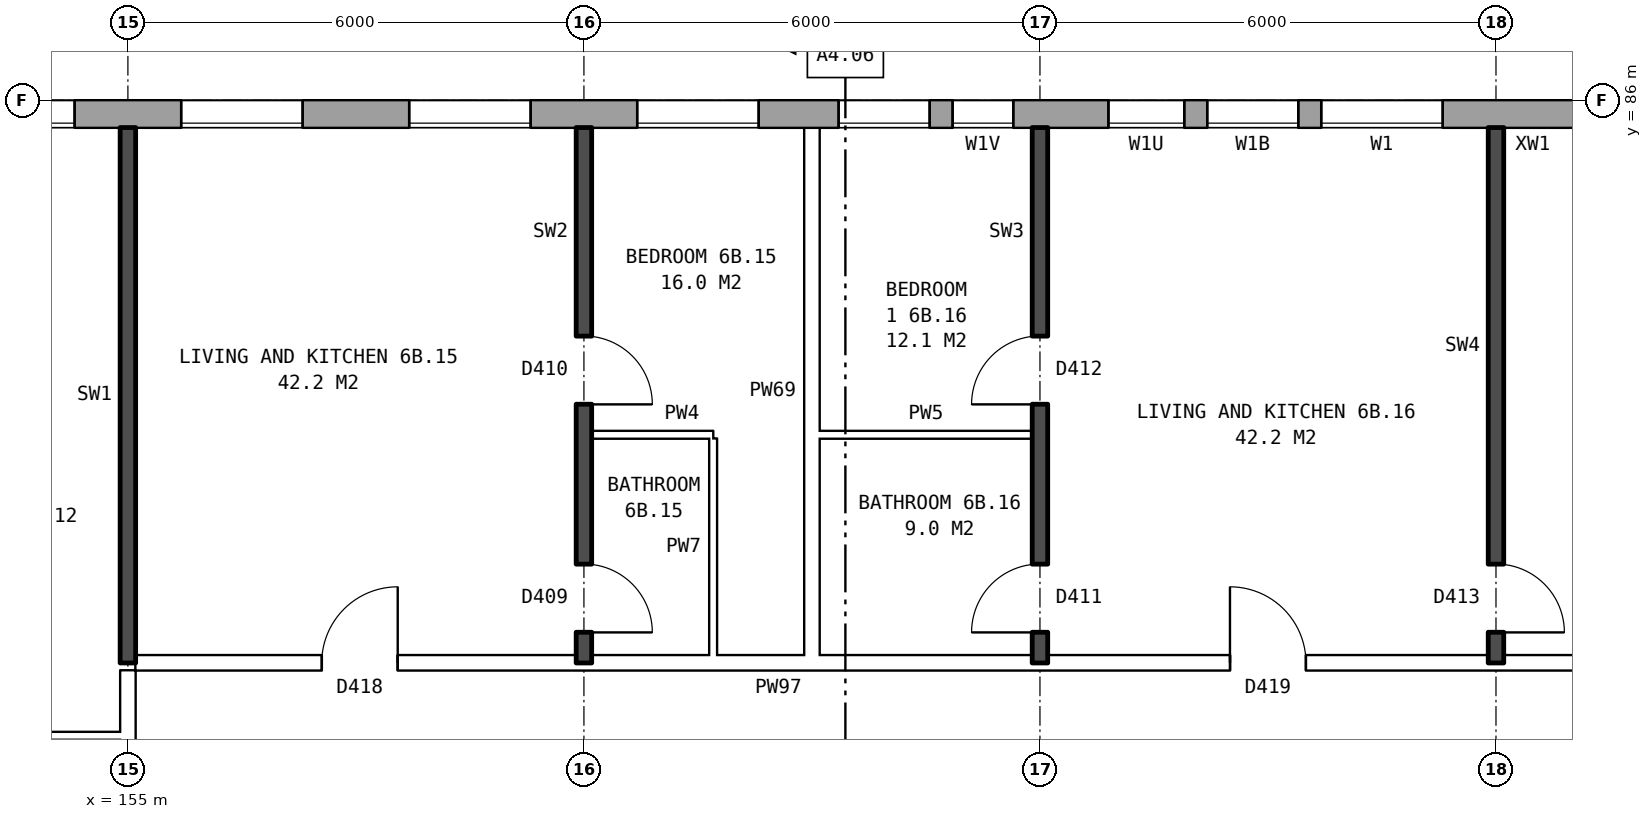
"""IFC4 building model, lengths in metres.
Left out: names, types, materials, properties, quantities, classifications, styles, units other than length and angle.
Written with IfcOpenShell. Run it as: python <this file> out.ifc"""

import sys

from ifc_helpers import new_model, si_unit, direction, frame, frame_2d, origin, place, context, subcontext, project, spatial, rectangle, extrude, element, fill, save


model = new_model("IFC4")
c1 = context("Model", 3, precision=1e-05, world=origin(), true_north=direction((0.0, 1.0)))
c2 = subcontext(c1, "Body", "Model", "MODEL_VIEW")
j1 = project(units=[si_unit("LENGTHUNIT", "METRE"), si_unit("PLANEANGLEUNIT", "RADIAN")], contexts=[c1])
p1 = place(None, origin())
s1 = spatial("IfcSite", under=j1, at=p1, CompositionType="ELEMENT")
p2 = place(p1, origin())
s2 = spatial("IfcBuilding", under=s1, at=p2, CompositionType="ELEMENT")
p3 = place(p2, frame((0.0, 0.0, 25.7)))
s3 = spatial("IfcBuildingStorey", under=s2, at=p3, CompositionType="ELEMENT", Elevation=25.7)
p4 = place(p3, frame((174.675, 85.82, 0.0), z_axis=(0.0, 0.0, 1.0), x_axis=(-1.0, 0.0, 0.0)))
e1 = element("IfcWall", 1, at=p4, inside=s3, PredefinedType="STANDARD", context=c2, shape_type="SweptSolid", body=[
    extrude(rectangle(XDim=40.601, YDim=0.36, at=frame_2d((20.3, 0.0))), origin(), (0.0, 0.0, 1.0), 2.85),
])
p5 = place(p4, frame((2.375, 0.0, 0.8)))
e2 = element("IfcOpeningElement", 2, at=p5, cuts=e1, PredefinedType="OPENING", context=c2, shape_type="SweptSolid", body=[
    extrude(rectangle(XDim=1.6, YDim=1.8, at=frame_2d((0.8, 0.9))), frame((0.0, 0.19, 0.0), z_axis=(0.0, -1.0, 0.0), x_axis=(1.0, 0.0, 0.0)), (0.0, 0.0, 1.0), 0.38),
])
p6 = place(p4, frame((4.275, 0.0, 0.8)))
e3 = element("IfcOpeningElement", 3, at=p6, cuts=e1, PredefinedType="OPENING", context=c2, shape_type="SweptSolid", body=[
    extrude(rectangle(XDim=1.2, YDim=1.8, at=frame_2d((0.6, 0.9))), frame((0.0, 0.19, 0.0), z_axis=(0.0, -1.0, 0.0), x_axis=(1.0, 0.0, 0.0)), (0.0, 0.0, 1.0), 0.38),
])
p7 = place(p4, frame((8.025, 0.0, 0.8)))
e4 = element("IfcOpeningElement", 4, at=p7, cuts=e1, PredefinedType="OPENING", context=c2, shape_type="SweptSolid", body=[
    extrude(rectangle(XDim=0.8, YDim=0.9, at=frame_2d((0.4, 0.45))), frame((0.0, 0.19, 0.0), z_axis=(0.0, -1.0, 0.0), x_axis=(1.0, 0.0, 0.0)), (0.0, 0.0, 1.0), 0.38),
])
p8 = place(p4, frame((11.375, 0.0, 0.8)))
e5 = element("IfcOpeningElement", 5, at=p8, cuts=e1, PredefinedType="OPENING", context=c2, shape_type="SweptSolid", body=[
    extrude(rectangle(XDim=1.6, YDim=1.8, at=frame_2d((0.8, 0.9))), frame((0.0, 0.19, 0.0), z_axis=(0.0, -1.0, 0.0), x_axis=(1.0, 0.0, 0.0)), (0.0, 0.0, 1.0), 0.38),
])
p9 = place(p4, frame((14.375, 0.0, 0.8)))
e6 = element("IfcOpeningElement", 6, at=p9, cuts=e1, PredefinedType="OPENING", context=c2, shape_type="SweptSolid", body=[
    extrude(rectangle(XDim=1.6, YDim=1.8, at=frame_2d((0.8, 0.9))), frame((0.0, 0.19, 0.0), z_axis=(0.0, -1.0, 0.0), x_axis=(1.0, 0.0, 0.0)), (0.0, 0.0, 1.0), 0.38),
])
p10 = place(p4, frame((17.375, 0.0, 0.8)))
e7 = element("IfcOpeningElement", 7, at=p10, cuts=e1, PredefinedType="OPENING", context=c2, shape_type="SweptSolid", body=[
    extrude(rectangle(XDim=1.6, YDim=1.8, at=frame_2d((0.8, 0.9))), frame((0.0, 0.19, 0.0), z_axis=(0.0, -1.0, 0.0), x_axis=(1.0, 0.0, 0.0)), (0.0, 0.0, 1.0), 0.38),
])
p11 = place(p4, frame((20.375, 0.0, 0.8)))
e8 = element("IfcOpeningElement", 8, at=p11, cuts=e1, PredefinedType="OPENING", context=c2, shape_type="SweptSolid", body=[
    extrude(rectangle(XDim=1.6, YDim=1.8, at=frame_2d((0.8, 0.9))), frame((0.0, 0.19, 0.0), z_axis=(0.0, -1.0, 0.0), x_axis=(1.0, 0.0, 0.0)), (0.0, 0.0, 1.0), 0.38),
])
p12 = place(p4, frame((23.375, 0.0, 0.8)))
e9 = element("IfcOpeningElement", 9, at=p12, cuts=e1, PredefinedType="OPENING", context=c2, shape_type="SweptSolid", body=[
    extrude(rectangle(XDim=1.6, YDim=1.8, at=frame_2d((0.8, 0.9))), frame((0.0, 0.19, 0.0), z_axis=(0.0, -1.0, 0.0), x_axis=(1.0, 0.0, 0.0)), (0.0, 0.0, 1.0), 0.38),
])
p13 = place(p4, frame((26.375, 0.0, 0.8)))
e10 = element("IfcOpeningElement", 10, at=p13, cuts=e1, PredefinedType="OPENING", context=c2, shape_type="SweptSolid", body=[
    extrude(rectangle(XDim=1.6, YDim=1.8, at=frame_2d((0.8, 0.9))), frame((0.0, 0.19, 0.0), z_axis=(0.0, -1.0, 0.0), x_axis=(1.0, 0.0, 0.0)), (0.0, 0.0, 1.0), 0.38),
])
p14 = place(p4, frame((29.375, 0.0, 0.8)))
e11 = element("IfcOpeningElement", 11, at=p14, cuts=e1, PredefinedType="OPENING", context=c2, shape_type="SweptSolid", body=[
    extrude(rectangle(XDim=1.6, YDim=1.8, at=frame_2d((0.8, 0.9))), frame((0.0, 0.19, 0.0), z_axis=(0.0, -1.0, 0.0), x_axis=(1.0, 0.0, 0.0)), (0.0, 0.0, 1.0), 0.38),
])
p15 = place(p4, frame((31.875, 0.0, 0.8)))
e12 = element("IfcOpeningElement", 12, at=p15, cuts=e1, PredefinedType="OPENING", context=c2, shape_type="SweptSolid", body=[
    extrude(rectangle(XDim=0.6, YDim=0.9, at=frame_2d((0.3, 0.45))), frame((0.0, 0.19, 0.0), z_axis=(0.0, -1.0, 0.0), x_axis=(1.0, 0.0, 0.0)), (0.0, 0.0, 1.0), 0.38),
])
p16 = place(p4, frame((35.375, 0.0, 0.8)))
e13 = element("IfcOpeningElement", 13, at=p16, cuts=e1, PredefinedType="OPENING", context=c2, shape_type="SweptSolid", body=[
    extrude(rectangle(XDim=1.6, YDim=1.8, at=frame_2d((0.8, 0.9))), frame((0.0, 0.19, 0.0), z_axis=(0.0, -1.0, 0.0), x_axis=(1.0, 0.0, 0.0)), (0.0, 0.0, 1.0), 0.38),
])
p17 = place(p4, frame((38.375, 0.0, 0.8)))
e14 = element("IfcOpeningElement", 14, at=p17, cuts=e1, PredefinedType="OPENING", context=c2, shape_type="SweptSolid", body=[
    extrude(rectangle(XDim=1.6, YDim=1.8, at=frame_2d((0.8, 0.9))), frame((0.0, 0.19, 0.0), z_axis=(0.0, -1.0, 0.0), x_axis=(1.0, 0.0, 0.0)), (0.0, 0.0, 1.0), 0.38),
])
p18 = place(p4, frame((5.775, 0.0, 1.7)))
e15 = element("IfcOpeningElement", 15, at=p18, cuts=e1, PredefinedType="OPENING", context=c2, shape_type="SweptSolid", body=[
    extrude(rectangle(XDim=1.0, YDim=0.9, at=frame_2d((0.5, 0.45))), frame((0.0, 0.19, 0.0), z_axis=(0.0, -1.0, 0.0), x_axis=(1.0, 0.0, 0.0)), (0.0, 0.0, 1.0), 0.38),
])
p19 = place(p4, frame((9.125, 0.0, 0.8)))
e16 = element("IfcOpeningElement", 16, at=p19, cuts=e1, PredefinedType="OPENING", context=c2, shape_type="SweptSolid", body=[
    extrude(rectangle(XDim=1.2, YDim=1.8, at=frame_2d((0.6, 0.9))), frame((0.0, 0.19, 0.0), z_axis=(0.0, -1.0, 0.0), x_axis=(1.0, 0.0, 0.0)), (0.0, 0.0, 1.0), 0.38),
])
p20 = place(p4, frame((33.825, 0.0, 1.7)))
e17 = element("IfcOpeningElement", 17, at=p20, cuts=e1, PredefinedType="OPENING", context=c2, shape_type="SweptSolid", body=[
    extrude(rectangle(XDim=1.2, YDim=0.9, at=frame_2d((0.6, 0.45))), frame((0.0, 0.19, 0.0), z_axis=(0.0, -1.0, 0.0), x_axis=(1.0, 0.0, 0.0)), (0.0, 0.0, 1.0), 0.38),
])
p21 = place(p3, frame((152.0, 77.64, 0.0), z_axis=(0.0, 0.0, 1.0), x_axis=(1.0, 0.0, 0.0)))
e18 = element("IfcWall", 18, at=p21, inside=s3, PredefinedType="PARTITIONING", context=c2, shape_type="SweptSolid", body=[
    extrude(rectangle(XDim=2.9, YDim=0.1, at=frame_2d((1.45, 0.0))), origin(), (0.0, 0.0, 1.0), 2.85),
])
p22 = place(p21, frame((1.0, 0.0, 0.0)))
e19 = element("IfcOpeningElement", 19, at=p22, cuts=e18, PredefinedType="OPENING", context=c2, shape_type="SweptSolid", body=[
    extrude(rectangle(XDim=0.9, YDim=2.1, at=frame_2d((0.45, 1.05))), frame((0.0, 0.06, 0.0), z_axis=(0.0, -1.0, 0.0), x_axis=(1.0, 0.0, 0.0)), (0.0, 0.0, 1.0), 0.12),
])
p23 = place(p3, frame((155.1, 78.6, 0.0), z_axis=(0.0, 0.0, 1.0), x_axis=(1.0, 0.0, 0.0)))
e20 = element("IfcWall", 20, at=p23, inside=s3, PredefinedType="PARTITIONING", context=c2, shape_type="SweptSolid", body=[
    extrude(rectangle(XDim=22.29, YDim=0.2, at=frame_2d((11.145, 0.0))), origin(), (0.0, 0.0, 1.0), 2.85),
])
p24 = place(p23, frame((2.45, 0.0, 0.0)))
e21 = element("IfcOpeningElement", 21, at=p24, cuts=e20, PredefinedType="OPENING", context=c2, shape_type="SweptSolid", body=[
    extrude(rectangle(XDim=1.0, YDim=2.1, at=frame_2d((0.5, 1.05))), frame((0.0, 0.11, 0.0), z_axis=(0.0, -1.0, 0.0), x_axis=(1.0, 0.0, 0.0)), (0.0, 0.0, 1.0), 0.22),
])
p25 = place(p23, frame((14.4, 0.0, 0.0)))
e22 = element("IfcOpeningElement", 22, at=p25, cuts=e20, PredefinedType="OPENING", context=c2, shape_type="SweptSolid", body=[
    extrude(rectangle(XDim=1.0, YDim=2.1, at=frame_2d((0.5, 1.05))), frame((0.0, 0.11, 0.0), z_axis=(0.0, -1.0, 0.0), x_axis=(1.0, 0.0, 0.0)), (0.0, 0.0, 1.0), 0.22),
])
p26 = place(p3, frame((161.1, 81.6, 0.0), z_axis=(0.0, 0.0, 1.0), x_axis=(1.0, 0.0, 0.0)))
e23 = element("IfcWall", 23, at=p26, inside=s3, PredefinedType="PARTITIONING", context=c2, shape_type="SweptSolid", body=[
    extrude(rectangle(XDim=1.6, YDim=0.1, at=frame_2d((0.8, 0.0))), origin(), (0.0, 0.0, 1.0), 2.85),
])
p27 = place(p3, frame((164.1, 81.6, 0.0), z_axis=(0.0, 0.0, 1.0), x_axis=(1.0, 0.0, 0.0)))
e24 = element("IfcWall", 24, at=p27, inside=s3, PredefinedType="PARTITIONING", context=c2, shape_type="SweptSolid", body=[
    extrude(rectangle(XDim=2.8, YDim=0.1, at=frame_2d((1.4, 0.0))), origin(), (0.0, 0.0, 1.0), 2.85),
])
p28 = place(p3, frame((155.0, 76.3, 0.0), z_axis=(0.0, 0.0, 1.0), x_axis=(0.0, 1.0, 0.0)))
e25 = element("IfcWall", 25, at=p28, inside=s3, PredefinedType="PARTITIONING", context=c2, shape_type="SweptSolid", body=[
    extrude(rectangle(XDim=2.2, YDim=0.2, at=frame_2d((1.1, 0.0))), origin(), (0.0, 0.0, 1.0), 2.85),
])
p29 = place(p3, frame((155.0, 78.6, 0.0), z_axis=(0.0, 0.0, 1.0), x_axis=(0.0, 1.0, 0.0)))
e26 = element("IfcWall", 26, at=p29, inside=s3, PredefinedType="SOLIDWALL", context=c2, shape_type="SweptSolid", body=[
    extrude(rectangle(XDim=7.04, YDim=0.2, at=frame_2d((3.52, 0.0))), origin(), (0.0, 0.0, 1.0), 2.85),
])
p30 = place(p3, frame((161.0, 78.6, 0.0), z_axis=(0.0, 0.0, 1.0), x_axis=(0.0, 1.0, 0.0)))
e27 = element("IfcWall", 27, at=p30, inside=s3, PredefinedType="SOLIDWALL", context=c2, shape_type="SweptSolid", body=[
    extrude(rectangle(XDim=7.04, YDim=0.2, at=frame_2d((3.52, 0.0))), origin(), (0.0, 0.0, 1.0), 2.85),
])
p31 = place(p30, frame((3.4, 0.0, 0.0)))
e28 = element("IfcOpeningElement", 28, at=p31, cuts=e27, PredefinedType="OPENING", context=c2, shape_type="SweptSolid", body=[
    extrude(rectangle(XDim=0.9, YDim=2.1, at=frame_2d((0.45, 1.05))), frame((0.0, 0.11, 0.0), z_axis=(0.0, -1.0, 0.0), x_axis=(1.0, 0.0, 0.0)), (0.0, 0.0, 1.0), 0.22),
])
p32 = place(p30, frame((0.4, 0.0, 0.0)))
e29 = element("IfcOpeningElement", 29, at=p32, cuts=e27, PredefinedType="OPENING", context=c2, shape_type="SweptSolid", body=[
    extrude(rectangle(XDim=0.9, YDim=2.1, at=frame_2d((0.45, 1.05))), frame((0.0, 0.11, 0.0), z_axis=(0.0, -1.0, 0.0), x_axis=(1.0, 0.0, 0.0)), (0.0, 0.0, 1.0), 0.22),
])
p33 = place(p3, frame((162.7, 78.7, 0.0), z_axis=(0.0, 0.0, 1.0), x_axis=(0.0, 1.0, 0.0)))
e30 = element("IfcWall", 30, at=p33, inside=s3, PredefinedType="PARTITIONING", context=c2, shape_type="SweptSolid", body=[
    extrude(rectangle(XDim=2.85, YDim=0.1, at=frame_2d((1.425, 0.0))), origin(), (0.0, 0.0, 1.0), 2.85),
])
p34 = place(p3, frame((164.0, 78.7, 0.0), z_axis=(0.0, 0.0, 1.0), x_axis=(0.0, 1.0, 0.0)))
e31 = element("IfcWall", 31, at=p34, inside=s3, PredefinedType="PARTITIONING", context=c2, shape_type="SweptSolid", body=[
    extrude(rectangle(XDim=6.94, YDim=0.2, at=frame_2d((3.47, 0.0))), origin(), (0.0, 0.0, 1.0), 2.85),
])
p35 = place(p3, frame((167.0, 78.6, 0.0), z_axis=(0.0, 0.0, 1.0), x_axis=(0.0, 1.0, 0.0)))
e32 = element("IfcWall", 32, at=p35, inside=s3, PredefinedType="SOLIDWALL", context=c2, shape_type="SweptSolid", body=[
    extrude(rectangle(XDim=7.04, YDim=0.2, at=frame_2d((3.52, 0.0))), origin(), (0.0, 0.0, 1.0), 2.85),
])
p36 = place(p35, frame((3.4, 0.0, 0.0)))
e33 = element("IfcOpeningElement", 33, at=p36, cuts=e32, PredefinedType="OPENING", context=c2, shape_type="SweptSolid", body=[
    extrude(rectangle(XDim=0.9, YDim=2.1, at=frame_2d((0.45, 1.05))), frame((0.0, 0.11, 0.0), z_axis=(0.0, -1.0, 0.0), x_axis=(1.0, 0.0, 0.0)), (0.0, 0.0, 1.0), 0.22),
])
p37 = place(p35, frame((0.4, 0.0, 0.0)))
e34 = element("IfcOpeningElement", 34, at=p37, cuts=e32, PredefinedType="OPENING", context=c2, shape_type="SweptSolid", body=[
    extrude(rectangle(XDim=0.9, YDim=2.1, at=frame_2d((0.45, 1.05))), frame((0.0, 0.11, 0.0), z_axis=(0.0, -1.0, 0.0), x_axis=(1.0, 0.0, 0.0)), (0.0, 0.0, 1.0), 0.22),
])
p38 = place(p3, frame((173.0, 78.6, 0.0), z_axis=(0.0, 0.0, 1.0), x_axis=(0.0, 1.0, 0.0)))
e35 = element("IfcWall", 35, at=p38, inside=s3, PredefinedType="SOLIDWALL", context=c2, shape_type="SweptSolid", body=[
    extrude(rectangle(XDim=7.04, YDim=0.2, at=frame_2d((3.52, 0.0))), origin(), (0.0, 0.0, 1.0), 2.85),
])
p39 = place(p38, frame((0.4, 0.0, 0.0)))
e36 = element("IfcOpeningElement", 36, at=p39, cuts=e35, PredefinedType="OPENING", context=c2, shape_type="SweptSolid", body=[
    extrude(rectangle(XDim=0.9, YDim=2.1, at=frame_2d((0.45, 1.05))), frame((0.0, 0.11, 0.0), z_axis=(0.0, -1.0, 0.0), x_axis=(1.0, 0.0, 0.0)), (0.0, 0.0, 1.0), 0.22),
])
p40 = place(p5, origin())
e37 = element("IfcWindow", 37, at=p40, inside=s3, PartitioningType="SINGLE_PANEL", PredefinedType="WINDOW", context=c2, shape_type="SweptSolid", body=[
    extrude(rectangle(XDim=1.6, YDim=1.8, at=frame_2d((0.8, 0.9))), frame((0.0, 0.15, 0.0), z_axis=(0.0, -1.0, 0.0), x_axis=(1.0, 0.0, 0.0)), (0.0, 0.0, 1.0), 0.06),
])
fill(e2, e37)
p41 = place(p6, origin())
e38 = element("IfcWindow", 38, at=p41, inside=s3, PartitioningType="SINGLE_PANEL", PredefinedType="WINDOW", context=c2, shape_type="SweptSolid", body=[
    extrude(rectangle(XDim=1.2, YDim=1.8, at=frame_2d((0.6, 0.9))), frame((0.0, 0.15, 0.0), z_axis=(0.0, -1.0, 0.0), x_axis=(1.0, 0.0, 0.0)), (0.0, 0.0, 1.0), 0.06),
])
fill(e3, e38)
p42 = place(p7, origin())
e39 = element("IfcWindow", 39, at=p42, inside=s3, PartitioningType="SINGLE_PANEL", PredefinedType="WINDOW", context=c2, shape_type="SweptSolid", body=[
    extrude(rectangle(XDim=0.8, YDim=0.9, at=frame_2d((0.4, 0.45))), frame((0.0, 0.15, 0.0), z_axis=(0.0, -1.0, 0.0), x_axis=(1.0, 0.0, 0.0)), (0.0, 0.0, 1.0), 0.06),
])
fill(e4, e39)
p43 = place(p8, origin())
e40 = element("IfcWindow", 40, at=p43, inside=s3, PartitioningType="SINGLE_PANEL", PredefinedType="WINDOW", context=c2, shape_type="SweptSolid", body=[
    extrude(rectangle(XDim=1.6, YDim=1.8, at=frame_2d((0.8, 0.9))), frame((0.0, 0.15, 0.0), z_axis=(0.0, -1.0, 0.0), x_axis=(1.0, 0.0, 0.0)), (0.0, 0.0, 1.0), 0.06),
])
fill(e5, e40)
p44 = place(p9, origin())
e41 = element("IfcWindow", 41, at=p44, inside=s3, PartitioningType="SINGLE_PANEL", PredefinedType="WINDOW", context=c2, shape_type="SweptSolid", body=[
    extrude(rectangle(XDim=1.6, YDim=1.8, at=frame_2d((0.8, 0.9))), frame((0.0, 0.15, 0.0), z_axis=(0.0, -1.0, 0.0), x_axis=(1.0, 0.0, 0.0)), (0.0, 0.0, 1.0), 0.06),
])
fill(e6, e41)
p45 = place(p10, origin())
e42 = element("IfcWindow", 42, at=p45, inside=s3, PartitioningType="SINGLE_PANEL", PredefinedType="WINDOW", context=c2, shape_type="SweptSolid", body=[
    extrude(rectangle(XDim=1.6, YDim=1.8, at=frame_2d((0.8, 0.9))), frame((0.0, 0.15, 0.0), z_axis=(0.0, -1.0, 0.0), x_axis=(1.0, 0.0, 0.0)), (0.0, 0.0, 1.0), 0.06),
])
fill(e7, e42)
p46 = place(p11, origin())
e43 = element("IfcWindow", 43, at=p46, inside=s3, PartitioningType="SINGLE_PANEL", PredefinedType="WINDOW", context=c2, shape_type="SweptSolid", body=[
    extrude(rectangle(XDim=1.6, YDim=1.8, at=frame_2d((0.8, 0.9))), frame((0.0, 0.15, 0.0), z_axis=(0.0, -1.0, 0.0), x_axis=(1.0, 0.0, 0.0)), (0.0, 0.0, 1.0), 0.06),
])
fill(e8, e43)
p47 = place(p31, frame((0.9, 0.0, 0.0), z_axis=(0.0, 0.0, 1.0), x_axis=(-1.0, 0.0, 0.0)))
e44 = element("IfcDoor", 44, at=p47, inside=s3, OperationType="SINGLE_SWING_RIGHT", PredefinedType="DOOR", context=c2, shape_type="SweptSolid", body=[
    extrude(rectangle(XDim=0.9, YDim=2.1, at=frame_2d((0.45, 1.05))), frame((0.0, 0.025, 0.0), z_axis=(0.0, -1.0, 0.0), x_axis=(1.0, 0.0, 0.0)), (0.0, 0.0, 1.0), 0.05),
])
fill(e28, e44)
p48 = place(p24, origin())
e45 = element("IfcDoor", 45, at=p48, inside=s3, OperationType="SINGLE_SWING_RIGHT", PredefinedType="DOOR", context=c2, shape_type="SweptSolid", body=[
    extrude(rectangle(XDim=1.0, YDim=2.1, at=frame_2d((0.5, 1.05))), frame((0.0, 0.025, 0.0), z_axis=(0.0, -1.0, 0.0), x_axis=(1.0, 0.0, 0.0)), (0.0, 0.0, 1.0), 0.05),
])
fill(e21, e45)
p49 = place(p32, frame((0.9, 0.0, 0.0), z_axis=(0.0, 0.0, 1.0), x_axis=(-1.0, 0.0, 0.0)))
e46 = element("IfcDoor", 46, at=p49, inside=s3, OperationType="SINGLE_SWING_RIGHT", PredefinedType="DOOR", context=c2, shape_type="SweptSolid", body=[
    extrude(rectangle(XDim=0.9, YDim=2.1, at=frame_2d((0.45, 1.05))), frame((0.0, 0.025, 0.0), z_axis=(0.0, -1.0, 0.0), x_axis=(1.0, 0.0, 0.0)), (0.0, 0.0, 1.0), 0.05),
])
fill(e29, e46)
p50 = place(p36, origin())
e47 = element("IfcDoor", 47, at=p50, inside=s3, OperationType="SINGLE_SWING_LEFT", PredefinedType="DOOR", context=c2, shape_type="SweptSolid", body=[
    extrude(rectangle(XDim=0.9, YDim=2.1, at=frame_2d((0.45, 1.05))), frame((0.0, 0.025, 0.0), z_axis=(0.0, -1.0, 0.0), x_axis=(1.0, 0.0, 0.0)), (0.0, 0.0, 1.0), 0.05),
])
fill(e33, e47)
p51 = place(p39, frame((0.9, 0.0, 0.0), z_axis=(0.0, 0.0, 1.0), x_axis=(-1.0, 0.0, 0.0)))
e48 = element("IfcDoor", 48, at=p51, inside=s3, OperationType="SINGLE_SWING_RIGHT", PredefinedType="DOOR", context=c2, shape_type="SweptSolid", body=[
    extrude(rectangle(XDim=0.9, YDim=2.1, at=frame_2d((0.45, 1.05))), frame((0.0, 0.025, 0.0), z_axis=(0.0, -1.0, 0.0), x_axis=(1.0, 0.0, 0.0)), (0.0, 0.0, 1.0), 0.05),
])
fill(e36, e48)
p52 = place(p25, origin())
e49 = element("IfcDoor", 49, at=p52, inside=s3, OperationType="SINGLE_SWING_LEFT", PredefinedType="DOOR", context=c2, shape_type="SweptSolid", body=[
    extrude(rectangle(XDim=1.0, YDim=2.1, at=frame_2d((0.5, 1.05))), frame((0.0, 0.025, 0.0), z_axis=(0.0, -1.0, 0.0), x_axis=(1.0, 0.0, 0.0)), (0.0, 0.0, 1.0), 0.05),
])
fill(e22, e49)
p53 = place(p37, origin())
e50 = element("IfcDoor", 50, at=p53, inside=s3, OperationType="SINGLE_SWING_LEFT", PredefinedType="DOOR", context=c2, shape_type="SweptSolid", body=[
    extrude(rectangle(XDim=0.9, YDim=2.1, at=frame_2d((0.45, 1.05))), frame((0.0, 0.025, 0.0), z_axis=(0.0, -1.0, 0.0), x_axis=(1.0, 0.0, 0.0)), (0.0, 0.0, 1.0), 0.05),
])
fill(e34, e50)
p54 = place(p18, origin())
e51 = element("IfcWindow", 51, at=p54, inside=s3, PartitioningType="SINGLE_PANEL", PredefinedType="WINDOW", context=c2, shape_type="SweptSolid", body=[
    extrude(rectangle(XDim=1.0, YDim=0.9, at=frame_2d((0.5, 0.45))), frame((0.0, 0.15, 0.0), z_axis=(0.0, -1.0, 0.0), x_axis=(1.0, 0.0, 0.0)), (0.0, 0.0, 1.0), 0.06),
])
fill(e15, e51)
p55 = place(p19, origin())
e52 = element("IfcWindow", 52, at=p55, inside=s3, PartitioningType="SINGLE_PANEL", PredefinedType="WINDOW", context=c2, shape_type="SweptSolid", body=[
    extrude(rectangle(XDim=1.2, YDim=1.8, at=frame_2d((0.6, 0.9))), frame((0.0, 0.15, 0.0), z_axis=(0.0, -1.0, 0.0), x_axis=(1.0, 0.0, 0.0)), (0.0, 0.0, 1.0), 0.06),
])
fill(e16, e52)
save(model, sys.argv[1])
